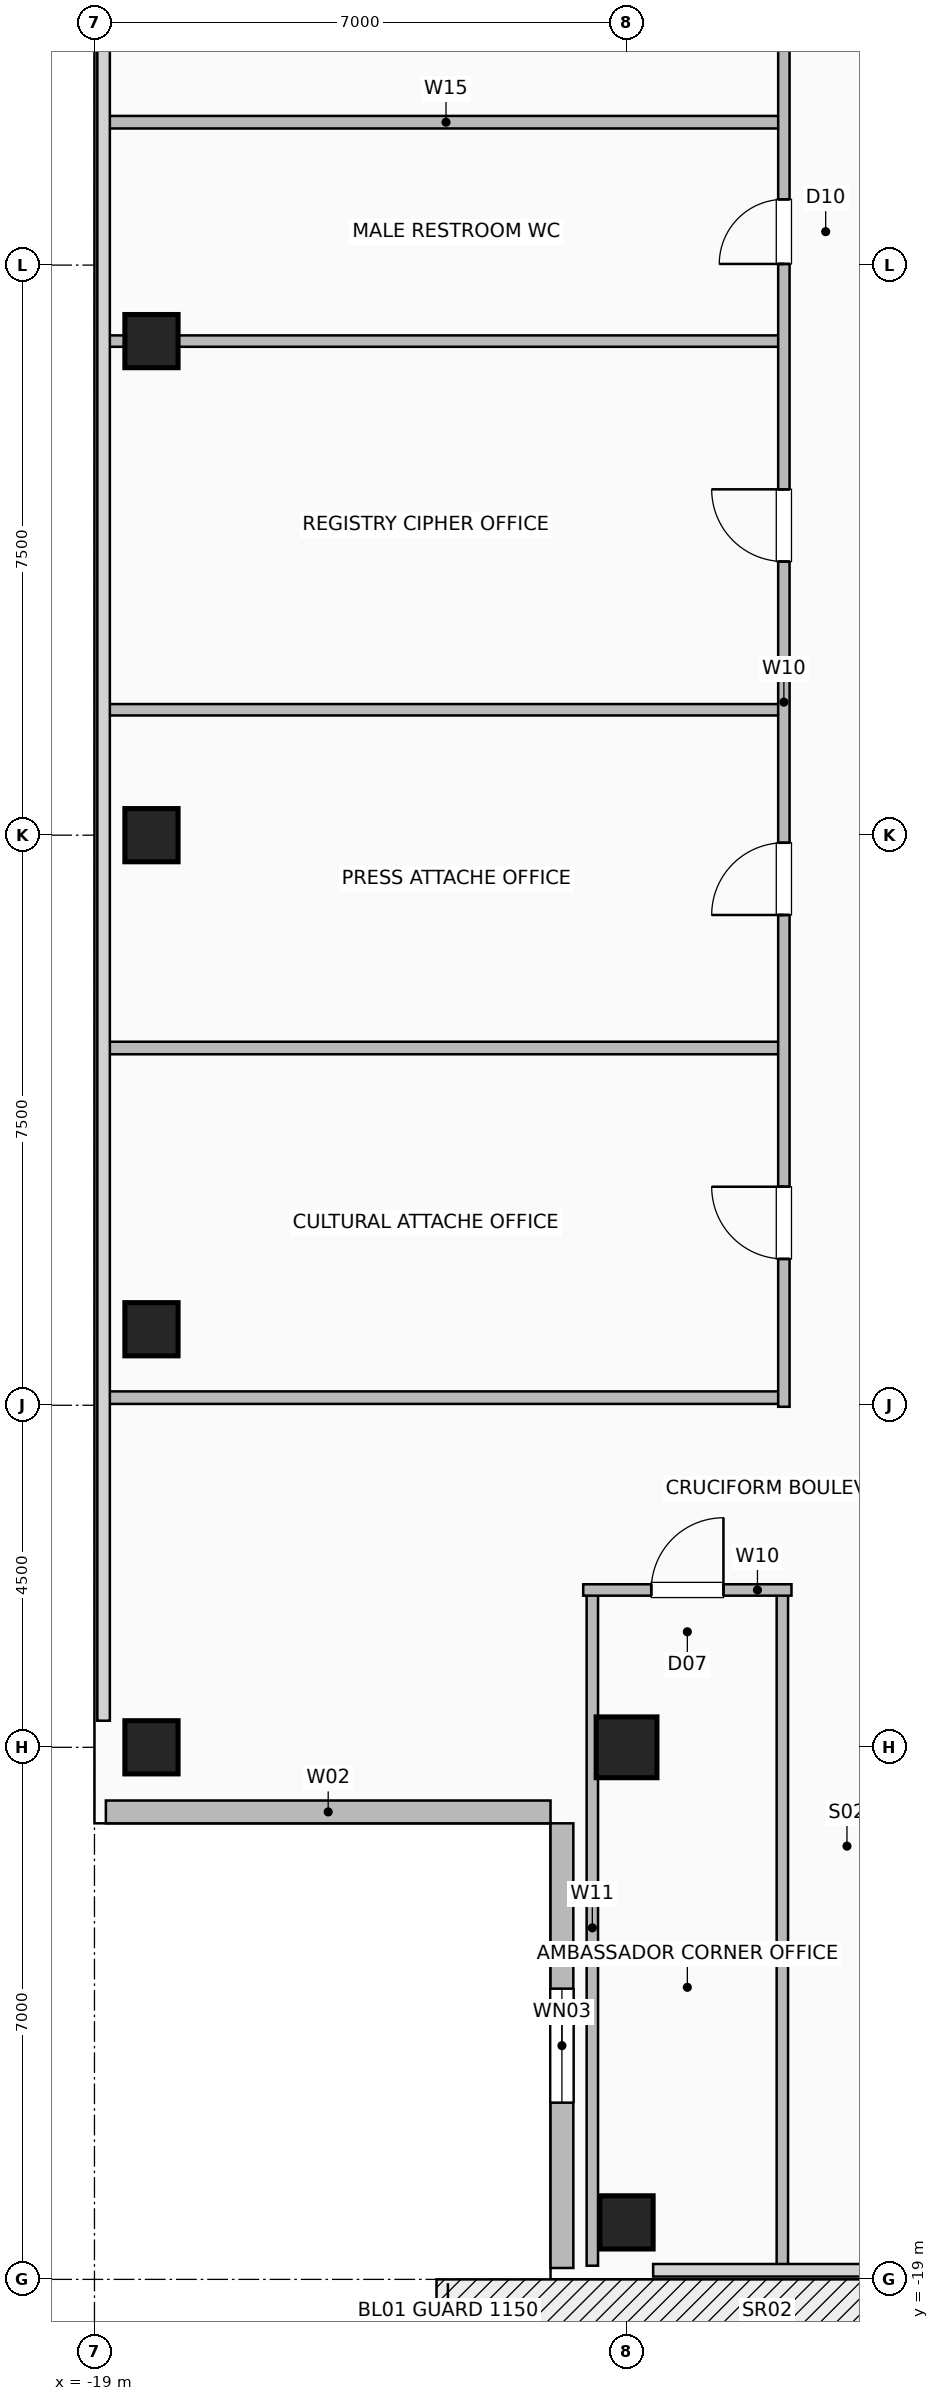
"""IFC4 building model, lengths in metres.
Left out: names, types, materials, properties, quantities, classifications, styles, units other than length and angle.
Written with IfcOpenShell. Run it as: python <this file> out.ifc"""

import sys

from ifc_helpers import new_model, si_unit, direction, frame, frame_2d, origin, origin_2d, place, context, subcontext, project, spatial, rectangle, hollow_rectangle, extrude, element, fill, save


model = new_model("IFC4")
c1 = context("Model", 3, precision=1e-05, world=origin(), true_north=direction((0.0, 1.0)))
c2 = subcontext(c1, "Body", "Model", "MODEL_VIEW")
j1 = project(units=[si_unit("LENGTHUNIT", "METRE"), si_unit("PLANEANGLEUNIT", "RADIAN")], contexts=[c1])
p1 = place(None, origin())
s1 = spatial("IfcSite", under=j1, at=p1, CompositionType="ELEMENT")
p2 = place(p1, origin())
s2 = spatial("IfcBuilding", under=s1, at=p2, CompositionType="ELEMENT")
p3 = place(p2, frame((0.0, 0.0, 232.4)))
s3 = spatial("IfcBuildingStorey", under=s2, at=p3, CompositionType="ELEMENT", Elevation=232.4)
for number, where, z_axis, x_axis in (
    (1, (-12.0, -18.25, -0.4), (0.0, 0.0, 1.0), (1.0, 0.0, 0.0)),
    (2, (-18.25, -12.0, -0.4), (0.0, 0.0, 1.0), (1.0, 0.0, 0.0)),
    (3, (-18.25, -6.5, -0.4), (0.0, 0.0, 1.0), (1.0, 0.0, 0.0)),
    (4, (-18.25, 0.0, -0.4), (0.0, 0.0, 1.0), (1.0, 0.0, 0.0)),
    (5, (-18.25, 6.5, -0.4), (0.0, 0.0, 1.0), (1.0, 0.0, 0.0)),
):
    element("IfcColumn", number, at=place(p3, frame(where, z_axis=z_axis, x_axis=x_axis)), inside=s3, PredefinedType="COLUMN", context=c2, shape_type="SweptSolid", body=[
        extrude(hollow_rectangle(XDim=0.7, YDim=0.7, WallThickness=0.035, at=origin_2d()), origin(), (0.0, 0.0, 1.0), 4.0),
    ])
p4 = place(p3, frame((-12.0, -12.0, -0.4), z_axis=(0.0, 0.0, 1.0), x_axis=(1.0, 0.0, 0.0)))
e6 = element("IfcColumn", 6, at=p4, inside=s3, PredefinedType="COLUMN", context=c2, shape_type="SweptSolid", body=[
    extrude(hollow_rectangle(XDim=0.8, YDim=0.8, WallThickness=0.04, at=origin_2d()), origin(), (0.0, 0.0, 1.0), 4.0),
])
p5 = place(p3, frame((-12.85, -18.85, 0.0), z_axis=(0.0, 0.0, 1.0), x_axis=(0.0, 1.0, 0.0)))
e7 = element("IfcWall", 7, at=p5, inside=s3, PredefinedType="SOLIDWALL", context=c2, shape_type="SweptSolid", body=[
    extrude(rectangle(XDim=5.85, YDim=0.3, at=frame_2d((2.925, 0.0))), origin(), (0.0, 0.0, 1.0), 3.36),
])
p6 = place(p5, frame((2.175, 0.0, 0.9)))
e8 = element("IfcOpeningElement", 8, at=p6, cuts=e7, PredefinedType="OPENING", context=c2, shape_type="SweptSolid", body=[
    extrude(rectangle(XDim=1.5, YDim=1.8, at=frame_2d((0.75, 0.9))), frame((0.0, 0.16, 0.0), z_axis=(0.0, -1.0, 0.0), x_axis=(1.0, 0.0, 0.0)), (0.0, 0.0, 1.0), 0.32),
])
p7 = place(p3, frame((-18.85, -12.85, 0.0), z_axis=(0.0, 0.0, 1.0), x_axis=(1.0, 0.0, 0.0)))
e9 = element("IfcWall", 9, at=p7, inside=s3, PredefinedType="SOLIDWALL", context=c2, shape_type="SweptSolid", body=[
    extrude(rectangle(XDim=5.85, YDim=0.3, at=frame_2d((2.925, 0.0))), origin(), (0.0, 0.0, 1.0), 3.36),
])
for number, where, z_axis, x_axis in (
    (10, (-12.45, -18.82, 0.0), (0.0, 0.0, 1.0), (0.0, 1.0, 0.0)),
    (11, (-9.95, -18.82, 0.0), (0.0, 0.0, 1.0), (0.0, 1.0, 0.0)),
):
    element("IfcWall", number, at=place(p3, frame(where, z_axis=z_axis, x_axis=x_axis)), inside=s3, PredefinedType="PARTITIONING", context=c2, shape_type="SweptSolid", body=[
        extrude(rectangle(XDim=8.89, YDim=0.15, at=frame_2d((4.445, 0.0))), origin(), (0.0, 0.0, 1.0), 3.36),
    ])
p8 = place(p3, frame((-12.57, -9.93, 0.0), z_axis=(0.0, 0.0, 1.0), x_axis=(1.0, 0.0, 0.0)))
e12 = element("IfcWall", 12, at=p8, inside=s3, PredefinedType="PARTITIONING", context=c2, shape_type="SweptSolid", body=[
    extrude(rectangle(XDim=2.74, YDim=0.15, at=frame_2d((1.37, 0.0))), origin(), (0.0, 0.0, 1.0), 3.36),
])
p9 = place(p8, frame((0.895, 0.0, 0.0)))
e13 = element("IfcOpeningElement", 13, at=p9, cuts=e12, PredefinedType="OPENING", context=c2, shape_type="SweptSolid", body=[
    extrude(rectangle(XDim=0.95, YDim=2.06, at=frame_2d((0.475, 1.03))), frame((0.0, 0.085, 0.0), z_axis=(0.0, -1.0, 0.0), x_axis=(1.0, 0.0, 0.0)), (0.0, 0.0, 1.0), 0.17),
])
for number, where, z_axis, x_axis in (
    (14, (-18.82, 9.38, 0.0), (0.0, 0.0, 1.0), (1.0, 0.0, 0.0)),
    (15, (-18.82, -7.4, 0.0), (0.0, 0.0, 1.0), (1.0, 0.0, 0.0)),
    (16, (-18.82, -2.8, 0.0), (0.0, 0.0, 1.0), (1.0, 0.0, 0.0)),
):
    element("IfcWall", number, at=place(p3, frame(where, z_axis=z_axis, x_axis=x_axis)), inside=s3, PredefinedType="PLUMBINGWALL", context=c2, shape_type="SweptSolid", body=[
        extrude(rectangle(XDim=8.89, YDim=0.165, at=frame_2d((4.445, 0.0))), origin(), (0.0, 0.0, 1.0), 3.36),
    ])
for number, where, z_axis, x_axis in (
    (17, (-18.82, 1.65, 0.0), (0.0, 0.0, 1.0), (1.0, 0.0, 0.0)),
    (18, (-18.82, 6.5, 0.0), (0.0, 0.0, 1.0), (1.0, 0.0, 0.0)),
):
    element("IfcWall", number, at=place(p3, frame(where, z_axis=z_axis, x_axis=x_axis)), inside=s3, PredefinedType="PARTITIONING", context=c2, shape_type="SweptSolid", body=[
        extrude(rectangle(XDim=8.89, YDim=0.15, at=frame_2d((4.445, 0.0))), origin(), (0.0, 0.0, 1.0), 3.36),
    ])
p10 = place(p3, frame((-9.93, -7.52, 0.0), z_axis=(0.0, 0.0, 1.0), x_axis=(0.0, 1.0, 0.0)))
e19 = element("IfcWall", 19, at=p10, inside=s3, PredefinedType="PARTITIONING", context=c2, shape_type="SweptSolid", body=[
    extrude(rectangle(XDim=20.09, YDim=0.15, at=frame_2d((10.045, 0.0))), origin(), (0.0, 0.0, 1.0), 3.36),
])
p11 = place(p10, frame((1.945, 0.0, 0.0)))
e20 = element("IfcOpeningElement", 20, at=p11, cuts=e19, PredefinedType="OPENING", context=c2, shape_type="SweptSolid", body=[
    extrude(rectangle(XDim=0.95, YDim=2.06, at=frame_2d((0.475, 1.03))), frame((0.0, 0.085, 0.0), z_axis=(0.0, -1.0, 0.0), x_axis=(1.0, 0.0, 0.0)), (0.0, 0.0, 1.0), 0.17),
])
p12 = place(p10, frame((6.47, 0.0, 0.0)))
e21 = element("IfcOpeningElement", 21, at=p12, cuts=e19, PredefinedType="OPENING", context=c2, shape_type="SweptSolid", body=[
    extrude(rectangle(XDim=0.95, YDim=2.06, at=frame_2d((0.475, 1.03))), frame((0.0, 0.085, 0.0), z_axis=(0.0, -1.0, 0.0), x_axis=(1.0, 0.0, 0.0)), (0.0, 0.0, 1.0), 0.17),
])
p13 = place(p10, frame((11.12, 0.0, 0.0)))
e22 = element("IfcOpeningElement", 22, at=p13, cuts=e19, PredefinedType="OPENING", context=c2, shape_type="SweptSolid", body=[
    extrude(rectangle(XDim=0.95, YDim=2.06, at=frame_2d((0.475, 1.03))), frame((0.0, 0.085, 0.0), z_axis=(0.0, -1.0, 0.0), x_axis=(1.0, 0.0, 0.0)), (0.0, 0.0, 1.0), 0.17),
])
p14 = place(p10, frame((15.035, 0.0, 0.0)))
e23 = element("IfcOpeningElement", 23, at=p14, cuts=e19, PredefinedType="OPENING", context=c2, shape_type="SweptSolid", body=[
    extrude(rectangle(XDim=0.85, YDim=2.05, at=frame_2d((0.425, 1.025))), frame((0.0, 0.085, 0.0), z_axis=(0.0, -1.0, 0.0), x_axis=(1.0, 0.0, 0.0)), (0.0, 0.0, 1.0), 0.17),
])
p15 = place(p10, frame((17.96, 0.0, 0.0)))
e24 = element("IfcOpeningElement", 24, at=p15, cuts=e19, PredefinedType="OPENING", context=c2, shape_type="SweptSolid", body=[
    extrude(rectangle(XDim=0.95, YDim=2.06, at=frame_2d((0.475, 1.03))), frame((0.0, 0.085, 0.0), z_axis=(0.0, -1.0, 0.0), x_axis=(1.0, 0.0, 0.0)), (0.0, 0.0, 1.0), 0.17),
])
p16 = place(p6, origin())
e25 = element("IfcWindow", 25, at=p16, inside=s3, PartitioningType="SINGLE_PANEL", PredefinedType="WINDOW", context=c2, shape_type="SweptSolid", body=[
    extrude(rectangle(XDim=1.5, YDim=1.8, at=frame_2d((0.75, 0.9))), frame((0.0, 0.03, 0.0), z_axis=(0.0, -1.0, 0.0), x_axis=(1.0, 0.0, 0.0)), (0.0, 0.0, 1.0), 0.06),
])
fill(e8, e25)
p17 = place(p9, origin())
e26 = element("IfcDoor", 26, at=p17, inside=s3, OperationType="SINGLE_SWING_RIGHT", PredefinedType="DOOR", context=c2, shape_type="SweptSolid", body=[
    extrude(rectangle(XDim=0.95, YDim=2.06, at=frame_2d((0.475, 1.03))), frame((0.0, 0.025, 0.0), z_axis=(0.0, -1.0, 0.0), x_axis=(1.0, 0.0, 0.0)), (0.0, 0.0, 1.0), 0.05),
])
fill(e13, e26)
p18 = place(p11, origin())
e27 = element("IfcDoor", 27, at=p18, inside=s3, OperationType="SINGLE_SWING_RIGHT", PredefinedType="DOOR", context=c2, shape_type="SweptSolid", body=[
    extrude(rectangle(XDim=0.95, YDim=2.06, at=frame_2d((0.475, 1.03))), frame((0.0, 0.025, 0.0), z_axis=(0.0, -1.0, 0.0), x_axis=(1.0, 0.0, 0.0)), (0.0, 0.0, 1.0), 0.05),
])
fill(e20, e27)
p19 = place(p12, origin())
e28 = element("IfcDoor", 28, at=p19, inside=s3, OperationType="SINGLE_SWING_LEFT", PredefinedType="DOOR", context=c2, shape_type="SweptSolid", body=[
    extrude(rectangle(XDim=0.95, YDim=2.06, at=frame_2d((0.475, 1.03))), frame((0.0, 0.025, 0.0), z_axis=(0.0, -1.0, 0.0), x_axis=(1.0, 0.0, 0.0)), (0.0, 0.0, 1.0), 0.05),
])
fill(e21, e28)
p20 = place(p13, origin())
e29 = element("IfcDoor", 29, at=p20, inside=s3, OperationType="SINGLE_SWING_RIGHT", PredefinedType="DOOR", context=c2, shape_type="SweptSolid", body=[
    extrude(rectangle(XDim=0.95, YDim=2.06, at=frame_2d((0.475, 1.03))), frame((0.0, 0.025, 0.0), z_axis=(0.0, -1.0, 0.0), x_axis=(1.0, 0.0, 0.0)), (0.0, 0.0, 1.0), 0.05),
])
fill(e22, e29)
p21 = place(p14, origin())
e30 = element("IfcDoor", 30, at=p21, inside=s3, OperationType="SINGLE_SWING_LEFT", PredefinedType="DOOR", context=c2, shape_type="SweptSolid", body=[
    extrude(rectangle(XDim=0.85, YDim=2.05, at=frame_2d((0.425, 1.025))), frame((0.0, 0.025, 0.0), z_axis=(0.0, -1.0, 0.0), x_axis=(1.0, 0.0, 0.0)), (0.0, 0.0, 1.0), 0.05),
])
fill(e23, e30)
save(model, sys.argv[1])
